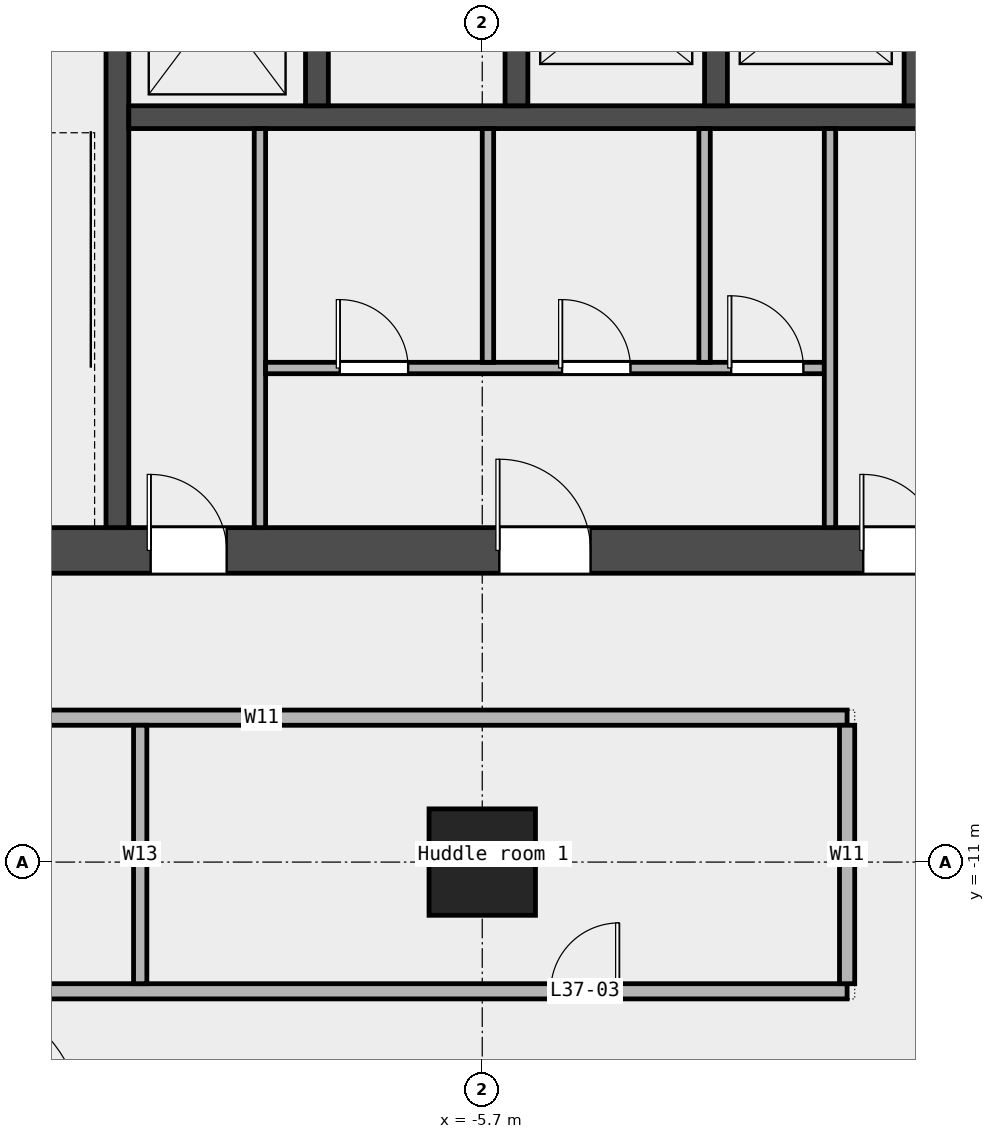
"""IFC4 building model, lengths in metres.
Left out: names, types, materials, properties, quantities, classifications, styles, units other than length and angle.
Written with IfcOpenShell. Run it as: python <this file> out.ifc"""

import sys

from ifc_helpers import new_model, si_unit, direction, frame, frame_2d, origin, origin_2d, place, context, subcontext, project, spatial, rectangle, extrude, element, fill, save


model = new_model("IFC4")
c1 = context("Model", 3, precision=1e-05, world=origin(), true_north=direction((0.0, 1.0)))
c2 = subcontext(c1, "Body", "Model", "MODEL_VIEW")
j1 = project(units=[si_unit("LENGTHUNIT", "METRE"), si_unit("PLANEANGLEUNIT", "RADIAN")], contexts=[c1])
p1 = place(None, origin())
s1 = spatial("IfcSite", under=j1, at=p1, CompositionType="ELEMENT")
p2 = place(p1, origin())
s2 = spatial("IfcBuilding", under=s1, at=p2, CompositionType="ELEMENT")
p3 = place(p2, frame((0.0, 0.0, 181.0)))
s3 = spatial("IfcBuildingStorey", under=s2, at=p3, CompositionType="ELEMENT", Elevation=181.0)
p4 = place(p3, frame((-5.7, -11.0, 0.0), z_axis=(0.0, 0.0, 1.0), x_axis=(1.0, 0.0, 0.0)))
e1 = element("IfcColumn", 1, at=p4, inside=s3, PredefinedType="COLUMN", context=c2, shape_type="SweptSolid", body=[
    extrude(rectangle(XDim=1.4, YDim=1.4, at=origin_2d()), origin(), (0.0, 0.0, 1.0), 3.6),
])
p5 = place(p3, frame((-24.15, -12.7, 0.0), z_axis=(0.0, 0.0, 1.0), x_axis=(1.0, 0.0, 0.0)))
e2 = element("IfcWall", 2, at=p5, inside=s3, PredefinedType="PARTITIONING", context=c2, shape_type="SweptSolid", body=[
    extrude(rectangle(XDim=23.25, YDim=0.2, at=frame_2d((11.625, 0.0))), origin(), (0.0, 0.0, 1.0), 3.6),
])
p6 = place(p5, frame((19.35, 0.0, 0.0)))
e3 = element("IfcOpeningElement", 3, at=p6, cuts=e2, PredefinedType="OPENING", context=c2, shape_type="SweptSolid", body=[
    extrude(rectangle(XDim=0.9, YDim=2.1, at=frame_2d((0.45, 1.05))), frame((0.0, 0.112, 0.0), z_axis=(0.0, -1.0, 0.0), x_axis=(1.0, 0.0, 0.0)), (0.0, 0.0, 1.0), 0.224),
])
p7 = place(p5, frame((7.825, 0.0, 0.0)))
e4 = element("IfcOpeningElement", 4, at=p7, cuts=e2, PredefinedType="OPENING", context=c2, shape_type="SweptSolid", body=[
    extrude(rectangle(XDim=1.5, YDim=2.1, at=frame_2d((0.75, 1.05))), frame((0.0, 0.112, 0.0), z_axis=(0.0, -1.0, 0.0), x_axis=(1.0, 0.0, 0.0)), (0.0, 0.0, 1.0), 0.224),
])
p8 = place(p3, frame((-16.3, -9.1, 0.0), z_axis=(0.0, 0.0, 1.0), x_axis=(1.0, 0.0, 0.0)))
e5 = element("IfcWall", 5, at=p8, inside=s3, PredefinedType="PARTITIONING", context=c2, shape_type="SweptSolid", body=[
    extrude(rectangle(XDim=15.4, YDim=0.2, at=frame_2d((7.7, 0.0))), origin(), (0.0, 0.0, 1.0), 3.6),
])
p9 = place(p3, frame((-10.2, -12.6, 0.0), z_axis=(0.0, 0.0, 1.0), x_axis=(0.0, 1.0, 0.0)))
e6 = element("IfcWall", 6, at=p9, inside=s3, PredefinedType="PARTITIONING", context=c2, shape_type="SweptSolid", body=[
    extrude(rectangle(XDim=3.4, YDim=0.175, at=frame_2d((1.7, 0.0))), origin(), (0.0, 0.0, 1.0), 3.6),
])
p10 = place(p3, frame((-0.9, -12.6, 0.0), z_axis=(0.0, 0.0, 1.0), x_axis=(0.0, 1.0, 0.0)))
e7 = element("IfcWall", 7, at=p10, inside=s3, PredefinedType="PARTITIONING", context=c2, shape_type="SweptSolid", body=[
    extrude(rectangle(XDim=3.4, YDim=0.2, at=frame_2d((1.7, 0.0))), origin(), (0.0, 0.0, 1.0), 3.6),
])
p11 = place(p3, frame((-14.4, -6.9, 0.0), z_axis=(0.0, 0.0, 1.0), x_axis=(1.0, 0.0, 0.0)))
e8 = element("IfcWall", 8, at=p11, inside=s3, PredefinedType="SHEAR", context=c2, shape_type="SweptSolid", body=[
    extrude(rectangle(XDim=28.8, YDim=0.6, at=frame_2d((14.4, 0.0))), origin(), (0.0, 0.0, 1.0), 3.7),
])
p12 = place(p11, frame((4.337, 0.0, 0.0)))
e9 = element("IfcOpeningElement", 9, at=p12, cuts=e8, PredefinedType="OPENING", context=c2, shape_type="SweptSolid", body=[
    extrude(rectangle(XDim=1.0, YDim=2.1, at=frame_2d((0.5, 1.05))), frame((0.0, 0.312, 0.0), z_axis=(0.0, -1.0, 0.0), x_axis=(1.0, 0.0, 0.0)), (0.0, 0.0, 1.0), 0.624),
])
p13 = place(p11, frame((8.925, 0.0, 0.0)))
e10 = element("IfcOpeningElement", 10, at=p13, cuts=e8, PredefinedType="OPENING", context=c2, shape_type="SweptSolid", body=[
    extrude(rectangle(XDim=1.2, YDim=2.1, at=frame_2d((0.6, 1.05))), frame((0.0, 0.312, 0.0), z_axis=(0.0, -1.0, 0.0), x_axis=(1.0, 0.0, 0.0)), (0.0, 0.0, 1.0), 0.624),
])
p14 = place(p11, frame((13.712, 0.0, 0.0)))
e11 = element("IfcOpeningElement", 11, at=p14, cuts=e8, PredefinedType="OPENING", context=c2, shape_type="SweptSolid", body=[
    extrude(rectangle(XDim=1.0, YDim=2.1, at=frame_2d((0.5, 1.05))), frame((0.0, 0.312, 0.0), z_axis=(0.0, -1.0, 0.0), x_axis=(1.0, 0.0, 0.0)), (0.0, 0.0, 1.0), 0.624),
])
p15 = place(p11, frame((15.587, 0.0, 0.0)))
e12 = element("IfcOpeningElement", 12, at=p15, cuts=e8, PredefinedType="OPENING", context=c2, shape_type="SweptSolid", body=[
    extrude(rectangle(XDim=1.0, YDim=2.1, at=frame_2d((0.5, 1.05))), frame((0.0, 0.312, 0.0), z_axis=(0.0, -1.0, 0.0), x_axis=(1.0, 0.0, 0.0)), (0.0, 0.0, 1.0), 0.624),
])
p16 = place(p11, frame((18.75, 0.0, 0.0)))
e13 = element("IfcOpeningElement", 13, at=p16, cuts=e8, PredefinedType="OPENING", context=c2, shape_type="SweptSolid", body=[
    extrude(rectangle(XDim=1.8, YDim=2.1, at=frame_2d((0.9, 1.05))), frame((0.0, 0.312, 0.0), z_axis=(0.0, -1.0, 0.0), x_axis=(1.0, 0.0, 0.0)), (0.0, 0.0, 1.0), 0.624),
])
p17 = place(p11, frame((23.087, 0.0, 0.0)))
e14 = element("IfcOpeningElement", 14, at=p17, cuts=e8, PredefinedType="OPENING", context=c2, shape_type="SweptSolid", body=[
    extrude(rectangle(XDim=1.0, YDim=2.1, at=frame_2d((0.5, 1.05))), frame((0.0, 0.312, 0.0), z_axis=(0.0, -1.0, 0.0), x_axis=(1.0, 0.0, 0.0)), (0.0, 0.0, 1.0), 0.624),
])
p18 = place(p3, frame((-10.5, -6.6, 0.0), z_axis=(0.0, 0.0, 1.0), x_axis=(0.0, 1.0, 0.0)))
e15 = element("IfcWall", 15, at=p18, inside=s3, PredefinedType="SHEAR", context=c2, shape_type="SweptSolid", body=[
    extrude(rectangle(XDim=8.55, YDim=0.3, at=frame_2d((4.275, 0.0))), origin(), (0.0, 0.0, 1.0), 3.7),
])
p19 = place(p3, frame((-10.35, -1.2, 0.0), z_axis=(0.0, 0.0, 1.0), x_axis=(1.0, 0.0, 0.0)))
e16 = element("IfcWall", 16, at=p19, inside=s3, PredefinedType="SOLIDWALL", context=c2, shape_type="SweptSolid", body=[
    extrude(rectangle(XDim=20.7, YDim=0.3, at=frame_2d((10.35, 0.0))), origin(), (0.0, 0.0, 1.0), 3.7),
])
for number, where, z_axis, x_axis in (
    (17, (-7.875, -1.05, 0.0), (0.0, 0.0, 1.0), (0.0, 1.0, 0.0)),
    (18, (-5.25, -1.05, 0.0), (0.0, 0.0, 1.0), (0.0, 1.0, 0.0)),
    (19, (-2.625, -1.05, 0.0), (0.0, 0.0, 1.0), (0.0, 1.0, 0.0)),
    (20, (0.0, -1.05, 0.0), (0.0, 0.0, 1.0), (0.0, 1.0, 0.0)),
):
    element("IfcWall", number, at=place(p3, frame(where, z_axis=z_axis, x_axis=x_axis)), inside=s3, PredefinedType="SOLIDWALL", context=c2, shape_type="SweptSolid", body=[
        extrude(rectangle(XDim=2.7, YDim=0.3, at=frame_2d((1.35, 0.0))), origin(), (0.0, 0.0, 1.0), 3.7),
    ])
p20 = place(p3, frame((-8.625, -6.6, 0.0), z_axis=(0.0, 0.0, 1.0), x_axis=(0.0, 1.0, 0.0)))
e21 = element("IfcWall", 21, at=p20, inside=s3, PredefinedType="PARTITIONING", context=c2, shape_type="SweptSolid", body=[
    extrude(rectangle(XDim=5.25, YDim=0.15, at=frame_2d((2.625, 0.0))), origin(), (0.0, 0.0, 1.0), 3.7),
])
p21 = place(p3, frame((-8.55, -4.5, 0.0), z_axis=(0.0, 0.0, 1.0), x_axis=(1.0, 0.0, 0.0)))
e22 = element("IfcWall", 22, at=p21, inside=s3, PredefinedType="PARTITIONING", context=c2, shape_type="SweptSolid", body=[
    extrude(rectangle(XDim=7.35, YDim=0.15, at=frame_2d((3.675, 0.0))), origin(), (0.0, 0.0, 1.0), 3.7),
])
p22 = place(p21, frame((0.975, 0.0, 0.0)))
e23 = element("IfcOpeningElement", 23, at=p22, cuts=e22, PredefinedType="OPENING", context=c2, shape_type="SweptSolid", body=[
    extrude(rectangle(XDim=0.9, YDim=2.1, at=frame_2d((0.45, 1.05))), frame((0.0, 0.087, 0.0), z_axis=(0.0, -1.0, 0.0), x_axis=(1.0, 0.0, 0.0)), (0.0, 0.0, 1.0), 0.174),
])
p23 = place(p21, frame((3.9, 0.0, 0.0)))
e24 = element("IfcOpeningElement", 24, at=p23, cuts=e22, PredefinedType="OPENING", context=c2, shape_type="SweptSolid", body=[
    extrude(rectangle(XDim=0.9, YDim=2.1, at=frame_2d((0.45, 1.05))), frame((0.0, 0.087, 0.0), z_axis=(0.0, -1.0, 0.0), x_axis=(1.0, 0.0, 0.0)), (0.0, 0.0, 1.0), 0.174),
])
p24 = place(p21, frame((6.125, 0.0, 0.0)))
e25 = element("IfcOpeningElement", 25, at=p24, cuts=e22, PredefinedType="OPENING", context=c2, shape_type="SweptSolid", body=[
    extrude(rectangle(XDim=0.95, YDim=2.1, at=frame_2d((0.475, 1.05))), frame((0.0, 0.087, 0.0), z_axis=(0.0, -1.0, 0.0), x_axis=(1.0, 0.0, 0.0)), (0.0, 0.0, 1.0), 0.174),
])
for number, where, z_axis, x_axis in (
    (26, (-5.625, -4.425, 0.0), (0.0, 0.0, 1.0), (0.0, 1.0, 0.0)),
    (27, (-2.775, -4.425, 0.0), (0.0, 0.0, 1.0), (0.0, 1.0, 0.0)),
):
    element("IfcWall", number, at=place(p3, frame(where, z_axis=z_axis, x_axis=x_axis)), inside=s3, PredefinedType="PARTITIONING", context=c2, shape_type="SweptSolid", body=[
        extrude(rectangle(XDim=3.075, YDim=0.15, at=frame_2d((1.538, 0.0))), origin(), (0.0, 0.0, 1.0), 3.7),
    ])
p25 = place(p3, frame((-1.125, -6.6, 0.0), z_axis=(0.0, 0.0, 1.0), x_axis=(0.0, 1.0, 0.0)))
e28 = element("IfcWall", 28, at=p25, inside=s3, PredefinedType="PARTITIONING", context=c2, shape_type="SweptSolid", body=[
    extrude(rectangle(XDim=5.25, YDim=0.15, at=frame_2d((2.625, 0.0))), origin(), (0.0, 0.0, 1.0), 3.7),
])
p26 = place(p6, origin())
e29 = element("IfcDoor", 29, at=p26, inside=s3, OperationType="SINGLE_SWING_RIGHT", PredefinedType="DOOR", context=c2, shape_type="SweptSolid", body=[
    extrude(rectangle(XDim=0.9, YDim=2.1, at=frame_2d((0.45, 1.05))), frame((0.0, 0.025, 0.0), z_axis=(0.0, -1.0, 0.0), x_axis=(1.0, 0.0, 0.0)), (0.0, 0.0, 1.0), 0.05),
])
fill(e3, e29)
p27 = place(p12, origin())
e30 = element("IfcDoor", 30, at=p27, inside=s3, OperationType="SINGLE_SWING_LEFT", PredefinedType="DOOR", context=c2, shape_type="SweptSolid", body=[
    extrude(rectangle(XDim=1.0, YDim=2.1, at=frame_2d((0.5, 1.05))), frame((0.0, 0.025, 0.0), z_axis=(0.0, -1.0, 0.0), x_axis=(1.0, 0.0, 0.0)), (0.0, 0.0, 1.0), 0.05),
])
fill(e9, e30)
p28 = place(p13, origin())
e31 = element("IfcDoor", 31, at=p28, inside=s3, OperationType="SINGLE_SWING_LEFT", PredefinedType="DOOR", context=c2, shape_type="SweptSolid", body=[
    extrude(rectangle(XDim=1.2, YDim=2.1, at=frame_2d((0.6, 1.05))), frame((0.0, 0.025, 0.0), z_axis=(0.0, -1.0, 0.0), x_axis=(1.0, 0.0, 0.0)), (0.0, 0.0, 1.0), 0.05),
])
fill(e10, e31)
p29 = place(p22, origin())
e32 = element("IfcDoor", 32, at=p29, inside=s3, OperationType="SINGLE_SWING_LEFT", PredefinedType="DOOR", context=c2, shape_type="SweptSolid", body=[
    extrude(rectangle(XDim=0.9, YDim=2.1, at=frame_2d((0.45, 1.05))), frame((0.0, 0.025, 0.0), z_axis=(0.0, -1.0, 0.0), x_axis=(1.0, 0.0, 0.0)), (0.0, 0.0, 1.0), 0.05),
])
fill(e23, e32)
p30 = place(p23, origin())
e33 = element("IfcDoor", 33, at=p30, inside=s3, OperationType="SINGLE_SWING_LEFT", PredefinedType="DOOR", context=c2, shape_type="SweptSolid", body=[
    extrude(rectangle(XDim=0.9, YDim=2.1, at=frame_2d((0.45, 1.05))), frame((0.0, 0.025, 0.0), z_axis=(0.0, -1.0, 0.0), x_axis=(1.0, 0.0, 0.0)), (0.0, 0.0, 1.0), 0.05),
])
fill(e24, e33)
p31 = place(p24, origin())
e34 = element("IfcDoor", 34, at=p31, inside=s3, OperationType="SINGLE_SWING_LEFT", PredefinedType="DOOR", context=c2, shape_type="SweptSolid", body=[
    extrude(rectangle(XDim=0.95, YDim=2.1, at=frame_2d((0.475, 1.05))), frame((0.0, 0.025, 0.0), z_axis=(0.0, -1.0, 0.0), x_axis=(1.0, 0.0, 0.0)), (0.0, 0.0, 1.0), 0.05),
])
fill(e25, e34)
p32 = place(p14, origin())
e35 = element("IfcDoor", 35, at=p32, inside=s3, OperationType="SINGLE_SWING_LEFT", PredefinedType="DOOR", context=c2, shape_type="SweptSolid", body=[
    extrude(rectangle(XDim=1.0, YDim=2.1, at=frame_2d((0.5, 1.05))), frame((0.0, 0.025, 0.0), z_axis=(0.0, -1.0, 0.0), x_axis=(1.0, 0.0, 0.0)), (0.0, 0.0, 1.0), 0.05),
])
fill(e11, e35)
save(model, sys.argv[1])
